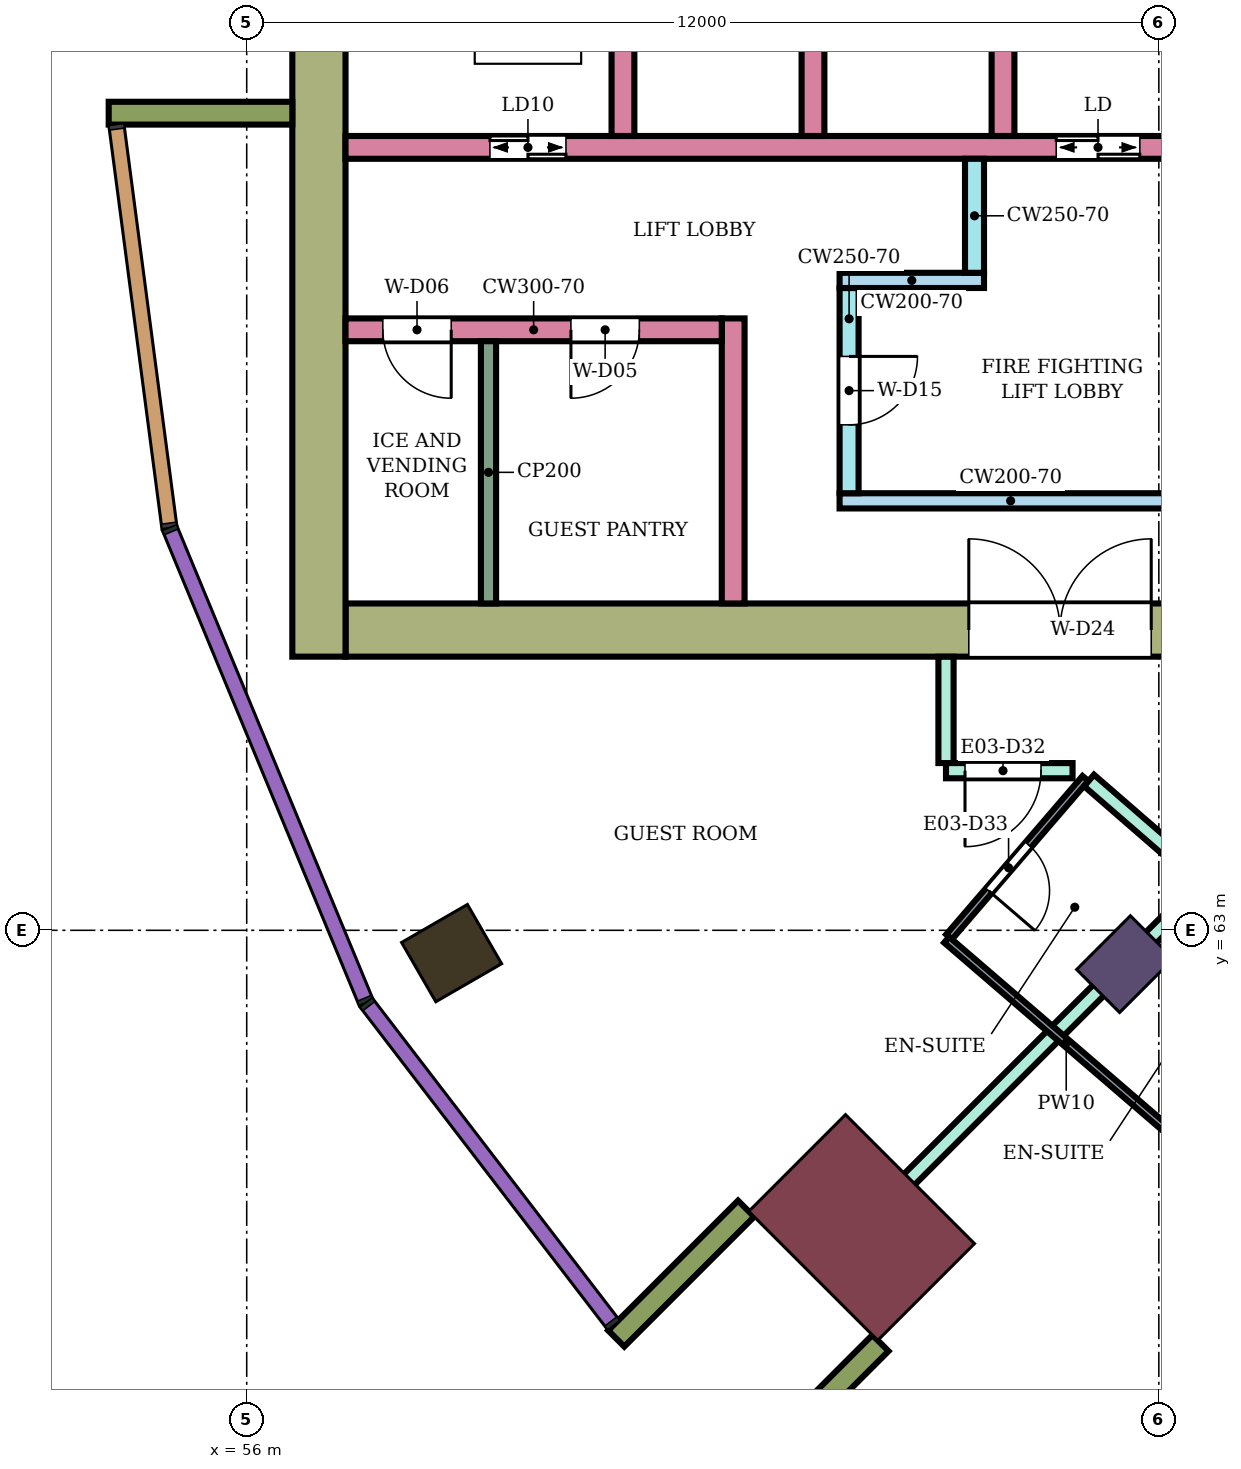
"""IFC4 building model, lengths in metres.
Left out: names, types, materials, properties, quantities, classifications, styles, units other than length and angle.
Written with IfcOpenShell. Run it as: python <this file> out.ifc"""

import sys

from ifc_helpers import new_model, si_unit, direction, frame, frame_2d, origin, origin_2d, place, context, subcontext, project, spatial, rectangle, extrude, element, fill, save


model = new_model("IFC4")
c1 = context("Model", 3, precision=1e-05, world=origin(), true_north=direction((0.0, 1.0)))
c2 = subcontext(c1, "Body", "Model", "MODEL_VIEW")
j1 = project(units=[si_unit("LENGTHUNIT", "METRE"), si_unit("PLANEANGLEUNIT", "RADIAN")], contexts=[c1])
p1 = place(None, origin())
s1 = spatial("IfcSite", under=j1, at=p1, CompositionType="ELEMENT")
p2 = place(p1, origin())
s2 = spatial("IfcBuilding", under=s1, at=p2, CompositionType="ELEMENT")
p3 = place(p2, frame((0.0, 0.0, 138.0)))
s3 = spatial("IfcBuildingStorey", under=s2, at=p3, CompositionType="ELEMENT", Elevation=138.0)
p4 = place(p3, frame((58.696, 62.7, 0.0), z_axis=(0.0, 0.0, 1.0), x_axis=(-0.866025403784, -0.5, 0.0)))
e1 = element("IfcColumn", 1, at=p4, inside=s3, PredefinedType="COLUMN", context=c2, shape_type="SweptSolid", body=[
    extrude(rectangle(XDim=1.0, YDim=0.9, at=origin_2d()), origin(), (0.0, 0.0, 1.0), 3.9),
])
p5 = place(p3, frame((67.555, 62.555, 0.0), z_axis=(0.0, 0.0, 1.0), x_axis=(-0.707106781187, -0.707106781187, 0.0)))
e2 = element("IfcColumn", 2, at=p5, inside=s3, PredefinedType="COLUMN", context=c2, shape_type="SweptSolid", body=[
    extrude(rectangle(XDim=1.0, YDim=0.8, at=origin_2d()), origin(), (0.0, 0.0, 1.0), 3.9),
])
p6 = place(p3, frame((64.09, 59.09, 0.0), z_axis=(0.0, 0.0, 1.0), x_axis=(-0.707106781187, -0.707106781187, 0.0)))
e3 = element("IfcColumn", 3, at=p6, inside=s3, PredefinedType="COLUMN", context=c2, shape_type="SweptSolid", body=[
    extrude(rectangle(XDim=1.8, YDim=2.4, at=origin_2d()), origin(), (0.0, 0.0, 1.0), 3.9),
])
p7 = place(p3, frame((72.1, 66.95, 0.0), z_axis=(0.0, 0.0, 1.0), x_axis=(-1.0, 0.0, 0.0)))
e4 = element("IfcWall", 4, at=p7, inside=s3, PredefinedType="SHEAR", context=c2, shape_type="SweptSolid", body=[
    extrude(rectangle(XDim=14.8, YDim=0.7, at=frame_2d((7.4, 0.0))), origin(), (0.0, 0.0, 1.0), 3.58),
])
p8 = place(p7, frame((4.2, 0.0, 0.0)))
e5 = element("IfcOpeningElement", 5, at=p8, cuts=e4, PredefinedType="OPENING", context=c2, shape_type="SweptSolid", body=[
    extrude(rectangle(XDim=2.4, YDim=2.4, at=frame_2d((1.2, 1.2))), frame((0.0, 0.36, 0.0), z_axis=(0.0, -1.0, 0.0), x_axis=(1.0, 0.0, 0.0)), (0.0, 0.0, 1.0), 0.72),
])
p9 = place(p3, frame((56.95, 83.4, 0.0), z_axis=(0.0, 0.0, 1.0), x_axis=(0.0, -1.0, 0.0)))
e6 = element("IfcWall", 6, at=p9, inside=s3, PredefinedType="SHEAR", context=c2, shape_type="SweptSolid", body=[
    extrude(rectangle(XDim=16.8, YDim=0.7, at=frame_2d((8.4, 0.0))), origin(), (0.0, 0.0, 1.0), 3.58),
])
p10 = place(p3, frame((68.3, 73.3, 0.0), z_axis=(0.0, 0.0, 1.0), x_axis=(-1.0, 0.0, 0.0)))
e7 = element("IfcWall", 7, at=p10, inside=s3, PredefinedType="SHEAR", context=c2, shape_type="SweptSolid", body=[
    extrude(rectangle(XDim=11.0, YDim=0.3, at=frame_2d((5.5, 0.0))), origin(), (0.0, 0.0, 1.0), 3.58),
])
p11 = place(p10, frame((0.55, 0.0, 0.0)))
e8 = element("IfcOpeningElement", 8, at=p11, cuts=e7, PredefinedType="OPENING", context=c2, shape_type="SweptSolid", body=[
    extrude(rectangle(XDim=1.1, YDim=2.1, at=frame_2d((0.55, 1.05))), frame((0.0, 0.16, 0.0), z_axis=(0.0, -1.0, 0.0), x_axis=(1.0, 0.0, 0.0)), (0.0, 0.0, 1.0), 0.32),
])
p12 = place(p10, frame((8.1, 0.0, 0.0)))
e9 = element("IfcOpeningElement", 9, at=p12, cuts=e7, PredefinedType="OPENING", context=c2, shape_type="SweptSolid", body=[
    extrude(rectangle(XDim=1.0, YDim=2.1, at=frame_2d((0.5, 1.05))), frame((0.0, 0.16, 0.0), z_axis=(0.0, -1.0, 0.0), x_axis=(1.0, 0.0, 0.0)), (0.0, 0.0, 1.0), 0.32),
])
for number, where, z_axis, x_axis in (
    (10, (65.95, 76.0, 0.0), (0.0, 0.0, 1.0), (0.0, -1.0, 0.0)),
    (11, (63.45, 76.0, 0.0), (0.0, 0.0, 1.0), (0.0, -1.0, 0.0)),
    (12, (60.95, 76.0, 0.0), (0.0, 0.0, 1.0), (0.0, -1.0, 0.0)),
):
    element("IfcWall", number, at=place(p3, frame(where, z_axis=z_axis, x_axis=x_axis)), inside=s3, PredefinedType="SHEAR", context=c2, shape_type="SweptSolid", body=[
        extrude(rectangle(XDim=2.55, YDim=0.3, at=frame_2d((1.275, 0.0))), origin(), (0.0, 0.0, 1.0), 3.58),
    ])
p13 = place(p3, frame((68.3, 68.65, 0.0), z_axis=(0.0, 0.0, 1.0), x_axis=(-1.0, 0.0, 0.0)))
e13 = element("IfcWall", 13, at=p13, inside=s3, PredefinedType="SHEAR", context=c2, shape_type="SweptSolid", body=[
    extrude(rectangle(XDim=4.5, YDim=0.2, at=frame_2d((2.25, 0.0))), origin(), (0.0, 0.0, 1.0), 3.58),
])
p14 = place(p3, frame((63.925, 71.45, 0.0), z_axis=(0.0, 0.0, 1.0), x_axis=(0.0, -1.0, 0.0)))
e14 = element("IfcWall", 14, at=p14, inside=s3, PredefinedType="SHEAR", context=c2, shape_type="SweptSolid", body=[
    extrude(rectangle(XDim=2.7, YDim=0.25, at=frame_2d((1.35, 0.0))), origin(), (0.0, 0.0, 1.0), 3.58),
])
p15 = place(p14, frame((0.9, 0.0, 0.0)))
e15 = element("IfcOpeningElement", 15, at=p15, cuts=e14, PredefinedType="OPENING", context=c2, shape_type="SweptSolid", body=[
    extrude(rectangle(XDim=0.9, YDim=2.1, at=frame_2d((0.45, 1.05))), frame((0.0, 0.135, 0.0), z_axis=(0.0, -1.0, 0.0), x_axis=(1.0, 0.0, 0.0)), (0.0, 0.0, 1.0), 0.27),
])
p16 = place(p3, frame((65.7, 71.55, 0.0), z_axis=(0.0, 0.0, 1.0), x_axis=(-1.0, 0.0, 0.0)))
e16 = element("IfcWall", 16, at=p16, inside=s3, PredefinedType="SHEAR", context=c2, shape_type="SweptSolid", body=[
    extrude(rectangle(XDim=1.9, YDim=0.2, at=frame_2d((0.95, 0.0))), origin(), (0.0, 0.0, 1.0), 3.58),
])
p17 = place(p3, frame((65.575, 73.15, 0.0), z_axis=(0.0, 0.0, 1.0), x_axis=(0.0, -1.0, 0.0)))
e17 = element("IfcWall", 17, at=p17, inside=s3, PredefinedType="SHEAR", context=c2, shape_type="SweptSolid", body=[
    extrude(rectangle(XDim=1.5, YDim=0.25, at=frame_2d((0.75, 0.0))), origin(), (0.0, 0.0, 1.0), 3.58),
])
p18 = place(p3, frame((62.4, 71.05, 0.0), z_axis=(0.0, 0.0, 1.0), x_axis=(0.0, -1.0, 0.0)))
e18 = element("IfcWall", 18, at=p18, inside=s3, PredefinedType="SHEAR", context=c2, shape_type="SweptSolid", body=[
    extrude(rectangle(XDim=3.75, YDim=0.3, at=frame_2d((1.875, 0.0))), origin(), (0.0, 0.0, 1.0), 3.58),
])
p19 = place(p3, frame((62.25, 70.9, 0.0), z_axis=(0.0, 0.0, 1.0), x_axis=(-1.0, 0.0, 0.0)))
e19 = element("IfcWall", 19, at=p19, inside=s3, PredefinedType="SHEAR", context=c2, shape_type="SweptSolid", body=[
    extrude(rectangle(XDim=4.95, YDim=0.3, at=frame_2d((2.475, 0.0))), origin(), (0.0, 0.0, 1.0), 3.58),
])
p20 = place(p19, frame((1.084, 0.0, 0.0)))
e20 = element("IfcOpeningElement", 20, at=p20, cuts=e19, PredefinedType="OPENING", context=c2, shape_type="SweptSolid", body=[
    extrude(rectangle(XDim=0.9, YDim=2.1, at=frame_2d((0.45, 1.05))), frame((0.0, 0.16, 0.0), z_axis=(0.0, -1.0, 0.0), x_axis=(1.0, 0.0, 0.0)), (0.0, 0.0, 1.0), 0.32),
])
p21 = place(p19, frame((3.56, 0.0, 0.0)))
e21 = element("IfcOpeningElement", 21, at=p21, cuts=e19, PredefinedType="OPENING", context=c2, shape_type="SweptSolid", body=[
    extrude(rectangle(XDim=0.9, YDim=2.1, at=frame_2d((0.45, 1.05))), frame((0.0, 0.16, 0.0), z_axis=(0.0, -1.0, 0.0), x_axis=(1.0, 0.0, 0.0)), (0.0, 0.0, 1.0), 0.32),
])
for number, where, z_axis, x_axis in (
    (22, (56.6, 73.75, 0.0), (0.0, 0.0, 1.0), (-1.0, 0.0, 0.0)),
    (23, (62.57, 59.338, 0.0), (0.0, 0.0, 1.0), (-0.707, -0.707, 0.0)),
    (24, (64.338, 57.57, 0.0), (0.0, 0.0, 1.0), (-0.707, -0.707, 0.0)),
):
    element("IfcWall", number, at=place(p3, frame(where, z_axis=z_axis, x_axis=x_axis)), inside=s3, PredefinedType="NOTDEFINED", context=c2, shape_type="SweptSolid", body=[
        extrude(rectangle(XDim=2.416, YDim=0.3, at=frame_2d((1.208, 0.0))), origin(), (0.0, 0.0, 1.0), 3.9),
    ])
p22 = place(p3, frame((63.593, 58.599, 0.0), z_axis=(0.0, 0.0, 1.0), x_axis=(0.707228748718, 0.706984792613, 0.0)))
e25 = element("IfcWall", 25, at=p22, inside=s3, PredefinedType="PARTITIONING", context=c2, shape_type="SweptSolid", body=[
    extrude(rectangle(XDim=7.005, YDim=0.2, at=frame_2d((3.503, 0.0))), origin(), (0.0, 0.0, 1.0), 3.45),
])
p23 = place(p3, frame((65.2, 65.2, 0.0), z_axis=(0.0, 0.0, 1.0), x_axis=(0.0, 1.0, 0.0)))
e26 = element("IfcWall", 26, at=p23, inside=s3, PredefinedType="PARTITIONING", context=c2, shape_type="SweptSolid", body=[
    extrude(rectangle(XDim=1.399, YDim=0.2, at=frame_2d((0.7, 0.0))), origin(), (0.0, 0.0, 1.0), 3.45),
])
p24 = place(p3, frame((65.2, 65.1, 0.0), z_axis=(0.0, 0.0, 1.0), x_axis=(1.0, 0.0, 0.0)))
e27 = element("IfcWall", 27, at=p24, inside=s3, PredefinedType="PARTITIONING", context=c2, shape_type="SweptSolid", body=[
    extrude(rectangle(XDim=1.665, YDim=0.2, at=frame_2d((0.833, 0.0))), origin(), (0.0, 0.0, 1.0), 3.45),
])
p25 = place(p24, frame((0.25, 0.0, 0.0)))
e28 = element("IfcOpeningElement", 28, at=p25, cuts=e27, PredefinedType="OPENING", context=c2, shape_type="SweptSolid", body=[
    extrude(rectangle(XDim=1.0, YDim=2.1, at=frame_2d((0.5, 1.05))), frame((0.0, 0.11, 0.0), z_axis=(0.0, -1.0, 0.0), x_axis=(1.0, 0.0, 0.0)), (0.0, 0.0, 1.0), 0.22),
])
p26 = place(p3, frame((67.082, 64.972, 0.0), z_axis=(0.0, 0.0, 1.0), x_axis=(0.755031061605, -0.65568902386, 0.0)))
e29 = element("IfcWall", 29, at=p26, inside=s3, PredefinedType="PARTITIONING", context=c2, shape_type="SweptSolid", body=[
    extrude(rectangle(XDim=6.186, YDim=0.2, at=frame_2d((3.093, 0.0))), origin(), (0.0, 0.0, 1.0), 3.45),
])
p27 = place(p26, frame((4.755, 0.0, 0.0)))
e30 = element("IfcOpeningElement", 30, at=p27, cuts=e29, PredefinedType="OPENING", context=c2, shape_type="SweptSolid", body=[
    extrude(rectangle(XDim=1.0, YDim=2.1, at=frame_2d((0.5, 1.05))), frame((0.0, 0.11, 0.0), z_axis=(0.0, -1.0, 0.0), x_axis=(1.0, 0.0, 0.0)), (0.0, 0.0, 1.0), 0.22),
])
p28 = place(p3, frame((67.097, 52.661, 0.0), z_axis=(0.0, 0.0, 1.0), x_axis=(0.500236379769, 0.865888886841, 0.0)))
e31 = element("IfcWall", 31, at=p28, inside=s3, PredefinedType="PARTITIONING", context=c2, shape_type="SweptSolid", body=[
    extrude(rectangle(XDim=9.375, YDim=0.2, at=frame_2d((4.688, 0.0))), origin(), (0.0, 0.0, 1.0), 3.45),
])
p29 = place(p3, frame((65.24, 62.913, 0.0), z_axis=(0.0, 0.0, 1.0), x_axis=(0.652069888227, 0.758158862553, 0.0)))
e32 = element("IfcWall", 32, at=p29, inside=s3, PredefinedType="PARTITIONING", context=c2, shape_type="SweptSolid", body=[
    extrude(rectangle(XDim=2.75, YDim=0.1, at=frame_2d((1.375, 0.0))), origin(), (0.0, 0.0, 1.0), 3.45),
])
p30 = place(p29, frame((0.8, 0.0, 0.0)))
e33 = element("IfcOpeningElement", 33, at=p30, cuts=e32, PredefinedType="OPENING", context=c2, shape_type="SweptSolid", body=[
    extrude(rectangle(XDim=0.8, YDim=2.1, at=frame_2d((0.4, 1.05))), frame((0.0, 0.06, 0.0), z_axis=(0.0, -1.0, 0.0), x_axis=(1.0, 0.0, 0.0)), (0.0, 0.0, 1.0), 0.12),
])
p31 = place(p3, frame((65.208, 62.875, 0.0), z_axis=(0.0, 0.0, 1.0), x_axis=(0.757943251005, -0.652320495045, 0.0)))
e34 = element("IfcWall", 34, at=p31, inside=s3, PredefinedType="PARTITIONING", context=c2, shape_type="SweptSolid", body=[
    extrude(rectangle(XDim=4.151, YDim=0.1, at=frame_2d((2.076, 0.0))), origin(), (0.0, 0.0, 1.0), 3.45),
])
p32 = place(p3, frame((59.181, 70.75, 0.0), z_axis=(0.0, 0.0, 1.0), x_axis=(0.0, -1.0, 0.0)))
e35 = element("IfcWall", 35, at=p32, inside=s3, PredefinedType="PARTITIONING", context=c2, shape_type="SweptSolid", body=[
    extrude(rectangle(XDim=3.45, YDim=0.2, at=frame_2d((1.725, 0.0))), origin(), (0.0, 0.0, 1.0), 3.58),
])
p33 = place(p25, frame((1.0, 0.0, 0.0), z_axis=(0.0, 0.0, 1.0), x_axis=(-1.0, 0.0, 0.0)))
e36 = element("IfcDoor", 36, at=p33, inside=s3, OperationType="SINGLE_SWING_RIGHT", PredefinedType="DOOR", context=c2, shape_type="SweptSolid", body=[
    extrude(rectangle(XDim=1.0, YDim=2.1, at=frame_2d((0.5, 1.05))), frame((0.0, 0.025, 0.0), z_axis=(0.0, -1.0, 0.0), x_axis=(1.0, 0.0, 0.0)), (0.0, 0.0, 1.0), 0.05),
])
fill(e28, e36)
p34 = place(p30, frame((0.8, 0.0, 0.0), z_axis=(0.0, 0.0, 1.0), x_axis=(-1.0, 0.0, 0.0)))
e37 = element("IfcDoor", 37, at=p34, inside=s3, OperationType="SINGLE_SWING_RIGHT", PredefinedType="DOOR", context=c2, shape_type="SweptSolid", body=[
    extrude(rectangle(XDim=0.8, YDim=2.1, at=frame_2d((0.4, 1.05))), frame((0.0, 0.025, 0.0), z_axis=(0.0, -1.0, 0.0), x_axis=(1.0, 0.0, 0.0)), (0.0, 0.0, 1.0), 0.05),
])
fill(e33, e37)
p35 = place(p11, origin())
e38 = element("IfcDoor", 38, at=p35, inside=s3, OperationType="DOUBLE_DOOR_SLIDING", PredefinedType="DOOR", context=c2, shape_type="SweptSolid", body=[
    extrude(rectangle(XDim=1.1, YDim=2.1, at=frame_2d((0.55, 1.05))), frame((0.0, 0.025, 0.0), z_axis=(0.0, -1.0, 0.0), x_axis=(1.0, 0.0, 0.0)), (0.0, 0.0, 1.0), 0.05),
])
fill(e8, e38)
p36 = place(p12, origin())
e39 = element("IfcDoor", 39, at=p36, inside=s3, OperationType="DOUBLE_DOOR_SLIDING", PredefinedType="DOOR", context=c2, shape_type="SweptSolid", body=[
    extrude(rectangle(XDim=1.0, YDim=2.1, at=frame_2d((0.5, 1.05))), frame((0.0, 0.025, 0.0), z_axis=(0.0, -1.0, 0.0), x_axis=(1.0, 0.0, 0.0)), (0.0, 0.0, 1.0), 0.05),
])
fill(e9, e39)
p37 = place(p15, origin())
e40 = element("IfcDoor", 40, at=p37, inside=s3, OperationType="SINGLE_SWING_LEFT", PredefinedType="DOOR", context=c2, shape_type="SweptSolid", body=[
    extrude(rectangle(XDim=0.9, YDim=2.1, at=frame_2d((0.45, 1.05))), frame((0.0, 0.025, 0.0), z_axis=(0.0, -1.0, 0.0), x_axis=(1.0, 0.0, 0.0)), (0.0, 0.0, 1.0), 0.05),
])
fill(e15, e40)
p38 = place(p20, origin())
e41 = element("IfcDoor", 41, at=p38, inside=s3, OperationType="SINGLE_SWING_RIGHT", PredefinedType="DOOR", context=c2, shape_type="SweptSolid", body=[
    extrude(rectangle(XDim=0.9, YDim=2.1, at=frame_2d((0.45, 1.05))), frame((0.0, 0.025, 0.0), z_axis=(0.0, -1.0, 0.0), x_axis=(1.0, 0.0, 0.0)), (0.0, 0.0, 1.0), 0.05),
])
fill(e20, e41)
p39 = place(p21, origin())
e42 = element("IfcDoor", 42, at=p39, inside=s3, OperationType="SINGLE_SWING_LEFT", PredefinedType="DOOR", context=c2, shape_type="SweptSolid", body=[
    extrude(rectangle(XDim=0.9, YDim=2.1, at=frame_2d((0.45, 1.05))), frame((0.0, 0.025, 0.0), z_axis=(0.0, -1.0, 0.0), x_axis=(1.0, 0.0, 0.0)), (0.0, 0.0, 1.0), 0.05),
])
fill(e21, e42)
p40 = place(p8, frame((2.4, 0.0, 0.0), z_axis=(0.0, 0.0, 1.0), x_axis=(-1.0, 0.0, 0.0)))
e43 = element("IfcDoor", 43, at=p40, inside=s3, OperationType="DOUBLE_DOOR_SINGLE_SWING", PredefinedType="DOOR", context=c2, shape_type="SweptSolid", body=[
    extrude(rectangle(XDim=2.4, YDim=2.4, at=frame_2d((1.2, 1.2))), frame((0.0, 0.025, 0.0), z_axis=(0.0, -1.0, 0.0), x_axis=(1.0, 0.0, 0.0)), (0.0, 0.0, 1.0), 0.05),
])
fill(e5, e43)
save(model, sys.argv[1])
